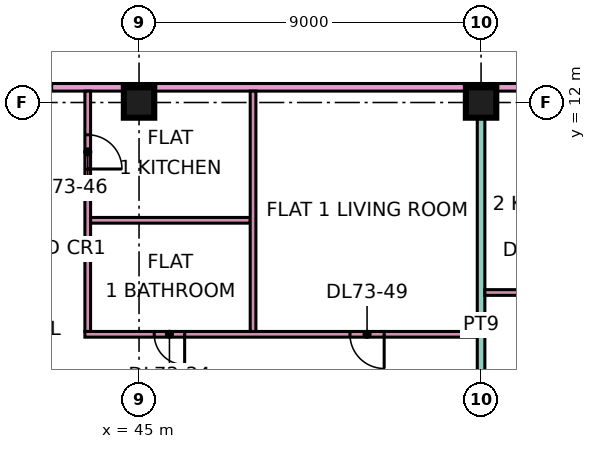
"""IFC4 building model, lengths in metres.
Left out: names, types, materials, properties, quantities, classifications, styles, units other than length and angle.
Written with IfcOpenShell. Run it as: python <this file> out.ifc"""

import sys

from ifc_helpers import new_model, si_unit, direction, frame, frame_2d, origin, origin_2d, place, context, subcontext, project, spatial, rectangle, extrude, element, fill, save


model = new_model("IFC4")
c1 = context("Model", 3, precision=1e-05, world=origin(), true_north=direction((0.0, 1.0)))
c2 = subcontext(c1, "Body", "Model", "MODEL_VIEW")
j1 = project(units=[si_unit("LENGTHUNIT", "METRE"), si_unit("PLANEANGLEUNIT", "RADIAN")], contexts=[c1])
p1 = place(None, origin())
s1 = spatial("IfcSite", under=j1, at=p1, CompositionType="ELEMENT")
p2 = place(p1, origin())
s2 = spatial("IfcBuilding", under=s1, at=p2, CompositionType="ELEMENT")
p3 = place(p2, frame((0.0, 0.0, 310.9)))
s3 = spatial("IfcBuildingStorey", under=s2, at=p3, CompositionType="ELEMENT", Elevation=310.9)
for number, where, z_axis, x_axis in (
    (1, (45.0, 12.0, 0.0), (0.0, 0.0, 1.0), (1.0, 0.0, 0.0)),
    (2, (54.0, 12.0, 0.0), (0.0, 0.0, 1.0), (1.0, 0.0, 0.0)),
):
    element("IfcColumn", number, at=place(p3, frame(where, z_axis=z_axis, x_axis=x_axis)), inside=s3, PredefinedType="COLUMN", context=c2, shape_type="SweptSolid", body=[
        extrude(rectangle(XDim=0.8, YDim=0.8, at=origin_2d()), origin(), (0.0, 0.0, 1.0), 3.75),
    ])
p4 = place(p3, frame((40.65, 12.4, 0.0), z_axis=(0.0, 0.0, 1.0), x_axis=(1.0, 0.0, 0.0)))
e3 = element("IfcWall", 3, at=p4, inside=s3, PredefinedType="PARTITIONING", context=c2, shape_type="SweptSolid", body=[
    extrude(rectangle(XDim=22.276, YDim=0.2, at=frame_2d((11.138, 0.0))), origin(), (0.0, 0.0, 1.0), 3.35),
])
p5 = place(p4, frame((20.4, 0.0, 0.0)))
e4 = element("IfcOpeningElement", 4, at=p5, cuts=e3, PredefinedType="OPENING", context=c2, shape_type="SweptSolid", body=[
    extrude(rectangle(XDim=1.0, YDim=2.1, at=frame_2d((0.5, 1.05))), frame((0.0, 0.11, 0.0), z_axis=(0.0, -1.0, 0.0), x_axis=(1.0, 0.0, 0.0)), (0.0, 0.0, 1.0), 0.22),
])
p6 = place(p4, frame((1.05, 0.0, 0.0)))
e5 = element("IfcOpeningElement", 5, at=p6, cuts=e3, PredefinedType="OPENING", context=c2, shape_type="SweptSolid", body=[
    extrude(rectangle(XDim=1.0, YDim=2.1, at=frame_2d((0.5, 1.05))), frame((0.0, 0.11, 0.0), z_axis=(0.0, -1.0, 0.0), x_axis=(1.0, 0.0, 0.0)), (0.0, 0.0, 1.0), 0.22),
])
p7 = place(p3, frame((43.575, 5.9, 0.0), z_axis=(0.0, 0.0, 1.0), x_axis=(1.0, 0.0, 0.0)))
e6 = element("IfcWall", 6, at=p7, inside=s3, PredefinedType="PARTITIONING", context=c2, shape_type="SweptSolid", body=[
    extrude(rectangle(XDim=10.325, YDim=0.15, at=frame_2d((5.163, 0.0))), origin(), (0.0, 0.0, 1.0), 3.35),
])
p8 = place(p7, frame((1.825, 0.0, 0.0)))
e7 = element("IfcOpeningElement", 7, at=p8, cuts=e6, PredefinedType="OPENING", context=c2, shape_type="SweptSolid", body=[
    extrude(rectangle(XDim=0.8, YDim=2.1, at=frame_2d((0.4, 1.05))), frame((0.0, 0.085, 0.0), z_axis=(0.0, -1.0, 0.0), x_axis=(1.0, 0.0, 0.0)), (0.0, 0.0, 1.0), 0.17),
])
p9 = place(p7, frame((6.975, 0.0, 0.0)))
e8 = element("IfcOpeningElement", 8, at=p9, cuts=e6, PredefinedType="OPENING", context=c2, shape_type="SweptSolid", body=[
    extrude(rectangle(XDim=0.9, YDim=2.1, at=frame_2d((0.45, 1.05))), frame((0.0, 0.085, 0.0), z_axis=(0.0, -1.0, 0.0), x_axis=(1.0, 0.0, 0.0)), (0.0, 0.0, 1.0), 0.17),
])
p10 = place(p3, frame((43.65, 5.975, 0.0), z_axis=(0.0, 0.0, 1.0), x_axis=(0.0, 1.0, 0.0)))
e9 = element("IfcWall", 9, at=p10, inside=s3, PredefinedType="PARTITIONING", context=c2, shape_type="SweptSolid", body=[
    extrude(rectangle(XDim=6.325, YDim=0.15, at=frame_2d((3.163, 0.0))), origin(), (0.0, 0.0, 1.0), 3.35),
])
p11 = place(p10, frame((4.275, 0.0, 0.0)))
e10 = element("IfcOpeningElement", 10, at=p11, cuts=e9, PredefinedType="OPENING", context=c2, shape_type="SweptSolid", body=[
    extrude(rectangle(XDim=0.9, YDim=2.1, at=frame_2d((0.45, 1.05))), frame((0.0, 0.085, 0.0), z_axis=(0.0, -1.0, 0.0), x_axis=(1.0, 0.0, 0.0)), (0.0, 0.0, 1.0), 0.17),
])
p12 = place(p3, frame((43.725, 8.9, 0.0), z_axis=(0.0, 0.0, 1.0), x_axis=(1.0, 0.0, 0.0)))
e11 = element("IfcWall", 11, at=p12, inside=s3, PredefinedType="PARTITIONING", context=c2, shape_type="SweptSolid", body=[
    extrude(rectangle(XDim=4.2, YDim=0.15, at=frame_2d((2.1, 0.0))), origin(), (0.0, 0.0, 1.0), 3.35),
])
p13 = place(p3, frame((48.0, 5.975, 0.0), z_axis=(0.0, 0.0, 1.0), x_axis=(0.0, 1.0, 0.0)))
e12 = element("IfcWall", 12, at=p13, inside=s3, PredefinedType="PARTITIONING", context=c2, shape_type="SweptSolid", body=[
    extrude(rectangle(XDim=6.325, YDim=0.15, at=frame_2d((3.163, 0.0))), origin(), (0.0, 0.0, 1.0), 3.35),
])
p14 = place(p3, frame((54.0, 0.0, 0.0), z_axis=(0.0, 0.0, 1.0), x_axis=(0.0, 1.0, 0.0)))
e13 = element("IfcWall", 13, at=p14, inside=s3, PredefinedType="PARTITIONING", context=c2, shape_type="SweptSolid", body=[
    extrude(rectangle(XDim=12.3, YDim=0.2, at=frame_2d((6.15, 0.0))), origin(), (0.0, 0.0, 1.0), 3.35),
])
p15 = place(p3, frame((54.1, 7.0, 0.0), z_axis=(0.0, 0.0, 1.0), x_axis=(1.0, 0.0, 0.0)))
e14 = element("IfcWall", 14, at=p15, inside=s3, PredefinedType="PARTITIONING", context=c2, shape_type="SweptSolid", body=[
    extrude(rectangle(XDim=5.975, YDim=0.15, at=frame_2d((2.987, 0.0))), origin(), (0.0, 0.0, 1.0), 3.35),
])
p16 = place(p15, frame((1.1, 0.0, 0.0)))
e15 = element("IfcOpeningElement", 15, at=p16, cuts=e14, PredefinedType="OPENING", context=c2, shape_type="SweptSolid", body=[
    extrude(rectangle(XDim=0.9, YDim=2.1, at=frame_2d((0.45, 1.05))), frame((0.0, 0.085, 0.0), z_axis=(0.0, -1.0, 0.0), x_axis=(1.0, 0.0, 0.0)), (0.0, 0.0, 1.0), 0.17),
])
p17 = place(p8, origin())
e16 = element("IfcDoor", 16, at=p17, inside=s3, OperationType="SINGLE_SWING_RIGHT", PredefinedType="DOOR", context=c2, shape_type="SweptSolid", body=[
    extrude(rectangle(XDim=0.8, YDim=2.1, at=frame_2d((0.4, 1.05))), frame((0.0, 0.025, 0.0), z_axis=(0.0, -1.0, 0.0), x_axis=(1.0, 0.0, 0.0)), (0.0, 0.0, 1.0), 0.05),
])
fill(e7, e16)
p18 = place(p11, frame((0.9, 0.0, 0.0), z_axis=(0.0, 0.0, 1.0), x_axis=(-1.0, 0.0, 0.0)))
e17 = element("IfcDoor", 17, at=p18, inside=s3, OperationType="SINGLE_SWING_LEFT", PredefinedType="DOOR", context=c2, shape_type="SweptSolid", body=[
    extrude(rectangle(XDim=0.9, YDim=2.1, at=frame_2d((0.45, 1.05))), frame((0.0, 0.025, 0.0), z_axis=(0.0, -1.0, 0.0), x_axis=(1.0, 0.0, 0.0)), (0.0, 0.0, 1.0), 0.05),
])
fill(e10, e17)
p19 = place(p9, origin())
e18 = element("IfcDoor", 18, at=p19, inside=s3, OperationType="SINGLE_SWING_RIGHT", PredefinedType="DOOR", context=c2, shape_type="SweptSolid", body=[
    extrude(rectangle(XDim=0.9, YDim=2.1, at=frame_2d((0.45, 1.05))), frame((0.0, 0.025, 0.0), z_axis=(0.0, -1.0, 0.0), x_axis=(1.0, 0.0, 0.0)), (0.0, 0.0, 1.0), 0.05),
])
fill(e8, e18)
save(model, sys.argv[1])
